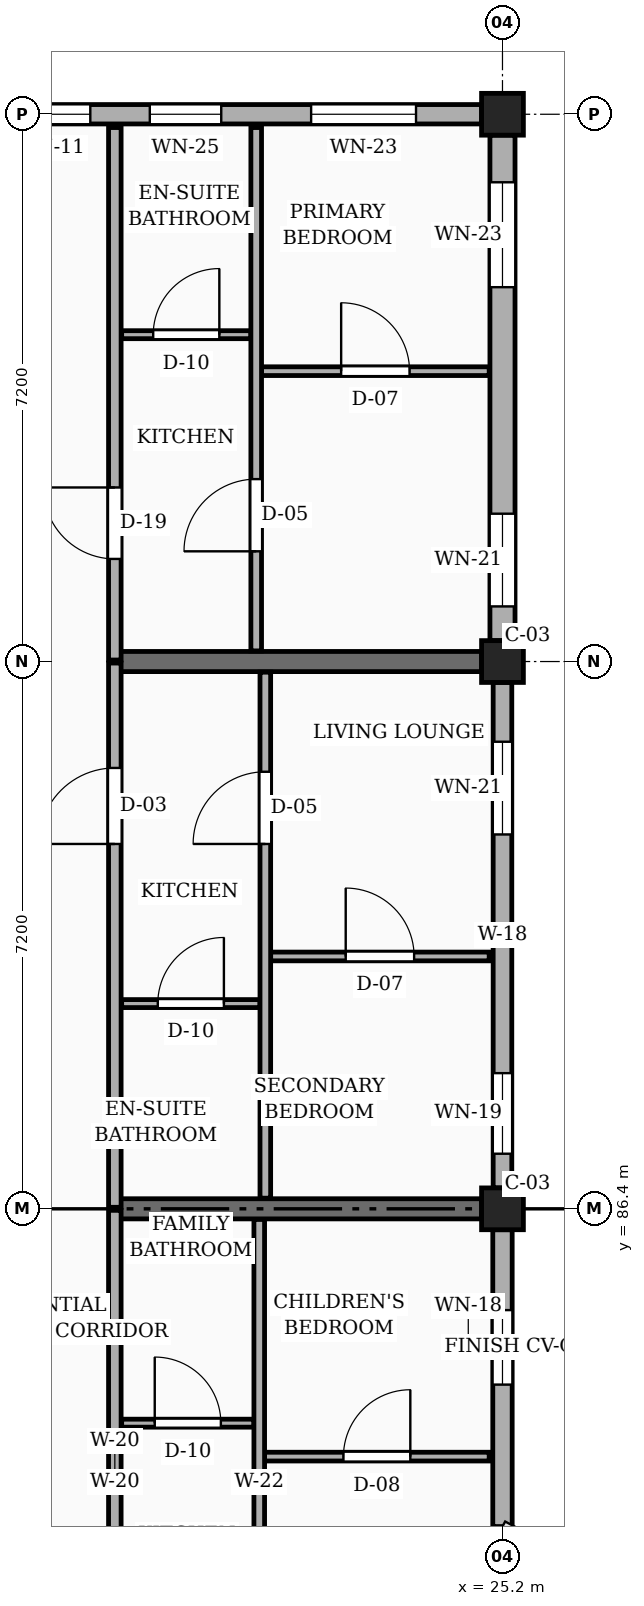
"""IFC4 building model, lengths in metres.
Left out: names, types, materials, properties, quantities, classifications, styles, units other than length and angle.
Written with IfcOpenShell. Run it as: python <this file> out.ifc"""

import sys

from ifc_helpers import new_model, si_unit, direction, frame, frame_2d, origin, origin_2d, place, context, subcontext, project, spatial, rectangle, extrude, element, fill, save


model = new_model("IFC4")
c1 = context("Model", 3, precision=1e-05, world=origin(), true_north=direction((0.0, 1.0)))
c2 = subcontext(c1, "Body", "Model", "MODEL_VIEW")
j1 = project(units=[si_unit("LENGTHUNIT", "METRE"), si_unit("PLANEANGLEUNIT", "RADIAN")], contexts=[c1])
p1 = place(None, origin())
s1 = spatial("IfcSite", under=j1, at=p1, CompositionType="ELEMENT")
p2 = place(p1, origin())
s2 = spatial("IfcBuilding", under=s1, at=p2, CompositionType="ELEMENT")
p3 = place(p2, frame((0.0, 0.0, 10.8)))
s3 = spatial("IfcBuildingStorey", under=s2, at=p3, CompositionType="ELEMENT", Elevation=10.8)
for number, where, z_axis, x_axis in (
    (1, (25.2, 86.4, 0.0), (0.0, 0.0, 1.0), (1.0, 0.0, 0.0)),
    (2, (25.2, 93.6, 0.0), (0.0, 0.0, 1.0), (1.0, 0.0, 0.0)),
    (3, (25.2, 100.8, 0.0), (0.0, 0.0, 1.0), (1.0, 0.0, 0.0)),
):
    element("IfcColumn", number, at=place(p3, frame(where, z_axis=z_axis, x_axis=x_axis)), inside=s3, PredefinedType="COLUMN", context=c2, shape_type="SweptSolid", body=[
        extrude(rectangle(XDim=0.55, YDim=0.55, at=origin_2d()), origin(), (0.0, 0.0, 1.0), 3.15),
    ])
for number, where, z_axis, x_axis in (
    (4, (20.1, 86.4, 0.0), (0.0, 0.0, 1.0), (1.0, 0.0, 0.0)),
    (5, (20.1, 93.6, 0.0), (0.0, 0.0, 1.0), (1.0, 0.0, 0.0)),
):
    element("IfcWall", number, at=place(p3, frame(where, z_axis=z_axis, x_axis=x_axis)), inside=s3, PredefinedType="SOLIDWALL", context=c2, shape_type="SweptSolid", body=[
        extrude(rectangle(XDim=4.825, YDim=0.265, at=frame_2d((2.413, 0.0))), origin(), (0.0, 0.0, 1.0), 2.21),
    ])
p4 = place(p3, frame((25.2, 82.22, 0.0), z_axis=(0.0, 0.0, 1.0), x_axis=(0.0, 1.0, 0.0)))
e6 = element("IfcWall", 6, at=p4, inside=s3, PredefinedType="SOLIDWALL", context=c2, shape_type="SweptSolid", body=[
    extrude(rectangle(XDim=3.905, YDim=0.255, at=frame_2d((1.953, 0.0))), origin(), (0.0, 0.0, 1.0), 2.48),
])
p5 = place(p4, frame((1.867, 0.0, 0.78)))
e7 = element("IfcOpeningElement", 7, at=p5, cuts=e6, PredefinedType="OPENING", context=c2, shape_type="SweptSolid", body=[
    extrude(rectangle(XDim=0.98, YDim=1.36, at=frame_2d((0.49, 0.68))), frame((0.0, 0.137, 0.0), z_axis=(0.0, -1.0, 0.0), x_axis=(1.0, 0.0, 0.0)), (0.0, 0.0, 1.0), 0.275),
])
p6 = place(p3, frame((25.2, 86.675, 0.0), z_axis=(0.0, 0.0, 1.0), x_axis=(0.0, 1.0, 0.0)))
e8 = element("IfcWall", 8, at=p6, inside=s3, PredefinedType="SOLIDWALL", context=c2, shape_type="SweptSolid", body=[
    extrude(rectangle(XDim=6.65, YDim=0.245, at=frame_2d((3.325, 0.0))), origin(), (0.0, 0.0, 1.0), 2.48),
])
p7 = place(p6, frame((0.45, 0.0, 0.78)))
e9 = element("IfcOpeningElement", 9, at=p7, cuts=e8, PredefinedType="OPENING", context=c2, shape_type="SweptSolid", body=[
    extrude(rectangle(XDim=1.06, YDim=1.36, at=frame_2d((0.53, 0.68))), frame((0.0, 0.133, 0.0), z_axis=(0.0, -1.0, 0.0), x_axis=(1.0, 0.0, 0.0)), (0.0, 0.0, 1.0), 0.265),
])
p8 = place(p6, frame((4.65, 0.0, 0.78)))
e10 = element("IfcOpeningElement", 10, at=p8, cuts=e8, PredefinedType="OPENING", context=c2, shape_type="SweptSolid", body=[
    extrude(rectangle(XDim=1.22, YDim=1.36, at=frame_2d((0.61, 0.68))), frame((0.0, 0.133, 0.0), z_axis=(0.0, -1.0, 0.0), x_axis=(1.0, 0.0, 0.0)), (0.0, 0.0, 1.0), 0.265),
])
p9 = place(p3, frame((25.2, 93.875, 0.0), z_axis=(0.0, 0.0, 1.0), x_axis=(0.0, 1.0, 0.0)))
e11 = element("IfcWall", 11, at=p9, inside=s3, PredefinedType="SOLIDWALL", context=c2, shape_type="SweptSolid", body=[
    extrude(rectangle(XDim=6.65, YDim=0.33, at=frame_2d((3.325, 0.0))), origin(), (0.0, 0.0, 1.0), 2.48),
])
p10 = place(p9, frame((0.45, 0.0, 0.78)))
e12 = element("IfcOpeningElement", 12, at=p10, cuts=e11, PredefinedType="OPENING", context=c2, shape_type="SweptSolid", body=[
    extrude(rectangle(XDim=1.22, YDim=1.36, at=frame_2d((0.61, 0.68))), frame((0.0, 0.175, 0.0), z_axis=(0.0, -1.0, 0.0), x_axis=(1.0, 0.0, 0.0)), (0.0, 0.0, 1.0), 0.35),
])
p11 = place(p9, frame((4.65, 0.0, 0.78)))
e13 = element("IfcOpeningElement", 13, at=p11, cuts=e11, PredefinedType="OPENING", context=c2, shape_type="SweptSolid", body=[
    extrude(rectangle(XDim=1.38, YDim=1.36, at=frame_2d((0.69, 0.68))), frame((0.0, 0.175, 0.0), z_axis=(0.0, -1.0, 0.0), x_axis=(1.0, 0.0, 0.0)), (0.0, 0.0, 1.0), 0.35),
])
p12 = place(p3, frame((24.925, 100.8, 0.0), z_axis=(0.0, 0.0, 1.0), x_axis=(-1.0, 0.0, 0.0)))
e14 = element("IfcWall", 14, at=p12, inside=s3, PredefinedType="SOLIDWALL", context=c2, shape_type="SweptSolid", body=[
    extrude(rectangle(XDim=6.65, YDim=0.255, at=frame_2d((3.325, 0.0))), origin(), (0.0, 0.0, 1.0), 2.48),
])
p13 = place(p12, frame((0.863, 0.0, 0.78)))
e15 = element("IfcOpeningElement", 15, at=p13, cuts=e14, PredefinedType="OPENING", context=c2, shape_type="SweptSolid", body=[
    extrude(rectangle(XDim=1.38, YDim=1.36, at=frame_2d((0.69, 0.68))), frame((0.0, 0.137, 0.0), z_axis=(0.0, -1.0, 0.0), x_axis=(1.0, 0.0, 0.0)), (0.0, 0.0, 1.0), 0.275),
])
p14 = place(p12, frame((3.425, 0.0, 0.78)))
e16 = element("IfcOpeningElement", 16, at=p14, cuts=e14, PredefinedType="OPENING", context=c2, shape_type="SweptSolid", body=[
    extrude(rectangle(XDim=0.94, YDim=1.44, at=frame_2d((0.47, 0.72))), frame((0.0, 0.137, 0.0), z_axis=(0.0, -1.0, 0.0), x_axis=(1.0, 0.0, 0.0)), (0.0, 0.0, 1.0), 0.275),
])
p15 = place(p12, frame((5.147, 0.0, 0.78)))
e17 = element("IfcOpeningElement", 17, at=p15, cuts=e14, PredefinedType="OPENING", context=c2, shape_type="SweptSolid", body=[
    extrude(rectangle(XDim=1.04, YDim=1.26, at=frame_2d((0.52, 0.63))), frame((0.0, 0.137, 0.0), z_axis=(0.0, -1.0, 0.0), x_axis=(1.0, 0.0, 0.0)), (0.0, 0.0, 1.0), 0.275),
])
p16 = place(p3, frame((20.1, 79.22, 0.0), z_axis=(0.0, 0.0, 1.0), x_axis=(0.0, 1.0, 0.0)))
e18 = element("IfcWall", 18, at=p16, inside=s3, PredefinedType="PARTITIONING", context=c2, shape_type="SweptSolid", body=[
    extrude(rectangle(XDim=7.16, YDim=0.165, at=frame_2d((3.58, 0.0))), origin(), (0.0, 0.0, 1.0), 2.345),
])
p17 = place(p16, frame((1.33, 0.0, 0.0)))
e19 = element("IfcOpeningElement", 19, at=p17, cuts=e18, PredefinedType="OPENING", context=c2, shape_type="SweptSolid", body=[
    extrude(rectangle(XDim=1.14, YDim=2.18, at=frame_2d((0.57, 1.09))), frame((0.0, 0.093, 0.0), z_axis=(0.0, -1.0, 0.0), x_axis=(1.0, 0.0, 0.0)), (0.0, 0.0, 1.0), 0.185),
])
p18 = place(p3, frame((20.1, 86.42, 0.0), z_axis=(0.0, 0.0, 1.0), x_axis=(0.0, 1.0, 0.0)))
e20 = element("IfcWall", 20, at=p18, inside=s3, PredefinedType="PARTITIONING", context=c2, shape_type="SweptSolid", body=[
    extrude(rectangle(XDim=7.16, YDim=0.165, at=frame_2d((3.58, 0.0))), origin(), (0.0, 0.0, 1.0), 2.345),
])
p19 = place(p18, frame((4.78, 0.0, 0.0)))
e21 = element("IfcOpeningElement", 21, at=p19, cuts=e20, PredefinedType="OPENING", context=c2, shape_type="SweptSolid", body=[
    extrude(rectangle(XDim=1.0, YDim=2.15, at=frame_2d((0.5, 1.075))), frame((0.0, 0.093, 0.0), z_axis=(0.0, -1.0, 0.0), x_axis=(1.0, 0.0, 0.0)), (0.0, 0.0, 1.0), 0.185),
])
p20 = place(p3, frame((20.1, 93.62, 0.0), z_axis=(0.0, 0.0, 1.0), x_axis=(0.0, 1.0, 0.0)))
e22 = element("IfcWall", 22, at=p20, inside=s3, PredefinedType="PARTITIONING", context=c2, shape_type="SweptSolid", body=[
    extrude(rectangle(XDim=7.005, YDim=0.165, at=frame_2d((3.502, 0.0))), origin(), (0.0, 0.0, 1.0), 2.345),
])
p21 = place(p20, frame((1.33, 0.0, 0.0)))
e23 = element("IfcOpeningElement", 23, at=p21, cuts=e22, PredefinedType="OPENING", context=c2, shape_type="SweptSolid", body=[
    extrude(rectangle(XDim=0.94, YDim=2.12, at=frame_2d((0.47, 1.06))), frame((0.0, 0.093, 0.0), z_axis=(0.0, -1.0, 0.0), x_axis=(1.0, 0.0, 0.0)), (0.0, 0.0, 1.0), 0.185),
])
p22 = place(p3, frame((22.07, 83.14, 0.0), z_axis=(0.0, 0.0, 1.0), x_axis=(1.0, 0.0, 0.0)))
e24 = element("IfcWall", 24, at=p22, inside=s3, PredefinedType="PARTITIONING", context=c2, shape_type="SweptSolid", body=[
    extrude(rectangle(XDim=2.955, YDim=0.115, at=frame_2d((1.478, 0.0))), origin(), (0.0, 0.0, 1.0), 2.345),
])
p23 = place(p22, frame((1.038, 0.0, 0.0)))
e25 = element("IfcOpeningElement", 25, at=p23, cuts=e24, PredefinedType="OPENING", context=c2, shape_type="SweptSolid", body=[
    extrude(rectangle(XDim=0.88, YDim=2.08, at=frame_2d((0.44, 1.04))), frame((0.0, 0.067, 0.0), z_axis=(0.0, -1.0, 0.0), x_axis=(1.0, 0.0, 0.0)), (0.0, 0.0, 1.0), 0.135),
])
p24 = place(p3, frame((20.19, 83.58, 0.0), z_axis=(0.0, 0.0, 1.0), x_axis=(1.0, 0.0, 0.0)))
e26 = element("IfcWall", 26, at=p24, inside=s3, PredefinedType="PARTITIONING", context=c2, shape_type="SweptSolid", body=[
    extrude(rectangle(XDim=1.74, YDim=0.105, at=frame_2d((0.87, 0.0))), origin(), (0.0, 0.0, 1.0), 2.345),
])
p25 = place(p24, frame((0.435, 0.0, 0.0)))
e27 = element("IfcOpeningElement", 27, at=p25, cuts=e26, PredefinedType="OPENING", context=c2, shape_type="SweptSolid", body=[
    extrude(rectangle(XDim=0.87, YDim=2.05, at=frame_2d((0.435, 1.025))), frame((0.0, 0.062, 0.0), z_axis=(0.0, -1.0, 0.0), x_axis=(1.0, 0.0, 0.0)), (0.0, 0.0, 1.0), 0.125),
])
p26 = place(p3, frame((22.0, 79.34, 0.0), z_axis=(0.0, 0.0, 1.0), x_axis=(0.0, 1.0, 0.0)))
e28 = element("IfcWall", 28, at=p26, inside=s3, PredefinedType="PARTITIONING", context=c2, shape_type="SweptSolid", body=[
    extrude(rectangle(XDim=6.92, YDim=0.14, at=frame_2d((3.46, 0.0))), origin(), (0.0, 0.0, 1.0), 2.345),
])
p27 = place(p26, frame((1.31, 0.0, 0.0)))
e29 = element("IfcOpeningElement", 29, at=p27, cuts=e28, PredefinedType="OPENING", context=c2, shape_type="SweptSolid", body=[
    extrude(rectangle(XDim=0.92, YDim=2.1, at=frame_2d((0.46, 1.05))), frame((0.0, 0.08, 0.0), z_axis=(0.0, -1.0, 0.0), x_axis=(1.0, 0.0, 0.0)), (0.0, 0.0, 1.0), 0.16),
])
p28 = place(p3, frame((22.15, 89.72, 0.0), z_axis=(0.0, 0.0, 1.0), x_axis=(1.0, 0.0, 0.0)))
e30 = element("IfcWall", 30, at=p28, inside=s3, PredefinedType="PARTITIONING", context=c2, shape_type="SweptSolid", body=[
    extrude(rectangle(XDim=2.875, YDim=0.115, at=frame_2d((1.438, 0.0))), origin(), (0.0, 0.0, 1.0), 2.345),
])
p29 = place(p28, frame((0.988, 0.0, 0.0)))
e31 = element("IfcOpeningElement", 31, at=p29, cuts=e30, PredefinedType="OPENING", context=c2, shape_type="SweptSolid", body=[
    extrude(rectangle(XDim=0.9, YDim=2.1, at=frame_2d((0.45, 1.05))), frame((0.0, 0.067, 0.0), z_axis=(0.0, -1.0, 0.0), x_axis=(1.0, 0.0, 0.0)), (0.0, 0.0, 1.0), 0.135),
])
p30 = place(p3, frame((20.19, 89.1, 0.0), z_axis=(0.0, 0.0, 1.0), x_axis=(1.0, 0.0, 0.0)))
e32 = element("IfcWall", 32, at=p30, inside=s3, PredefinedType="PARTITIONING", context=c2, shape_type="SweptSolid", body=[
    extrude(rectangle(XDim=1.82, YDim=0.105, at=frame_2d((0.91, 0.0))), origin(), (0.0, 0.0, 1.0), 2.345),
])
p31 = place(p30, frame((0.475, 0.0, 0.0)))
e33 = element("IfcOpeningElement", 33, at=p31, cuts=e32, PredefinedType="OPENING", context=c2, shape_type="SweptSolid", body=[
    extrude(rectangle(XDim=0.87, YDim=2.05, at=frame_2d((0.435, 1.025))), frame((0.0, 0.062, 0.0), z_axis=(0.0, -1.0, 0.0), x_axis=(1.0, 0.0, 0.0)), (0.0, 0.0, 1.0), 0.125),
])
p32 = place(p3, frame((22.08, 86.54, 0.0), z_axis=(0.0, 0.0, 1.0), x_axis=(0.0, 1.0, 0.0)))
e34 = element("IfcWall", 34, at=p32, inside=s3, PredefinedType="PARTITIONING", context=c2, shape_type="SweptSolid", body=[
    extrude(rectangle(XDim=6.92, YDim=0.14, at=frame_2d((3.46, 0.0))), origin(), (0.0, 0.0, 1.0), 2.345),
])
p33 = place(p32, frame((4.66, 0.0, 0.0)))
e35 = element("IfcOpeningElement", 35, at=p33, cuts=e34, PredefinedType="OPENING", context=c2, shape_type="SweptSolid", body=[
    extrude(rectangle(XDim=0.95, YDim=2.1, at=frame_2d((0.475, 1.05))), frame((0.0, 0.08, 0.0), z_axis=(0.0, -1.0, 0.0), x_axis=(1.0, 0.0, 0.0)), (0.0, 0.0, 1.0), 0.16),
])
p34 = place(p3, frame((22.03, 97.42, 0.0), z_axis=(0.0, 0.0, 1.0), x_axis=(1.0, 0.0, 0.0)))
e36 = element("IfcWall", 36, at=p34, inside=s3, PredefinedType="PARTITIONING", context=c2, shape_type="SweptSolid", body=[
    extrude(rectangle(XDim=2.995, YDim=0.115, at=frame_2d((1.498, 0.0))), origin(), (0.0, 0.0, 1.0), 2.345),
])
p35 = place(p34, frame((1.048, 0.0, 0.0)))
e37 = element("IfcOpeningElement", 37, at=p35, cuts=e36, PredefinedType="OPENING", context=c2, shape_type="SweptSolid", body=[
    extrude(rectangle(XDim=0.9, YDim=2.1, at=frame_2d((0.45, 1.05))), frame((0.0, 0.067, 0.0), z_axis=(0.0, -1.0, 0.0), x_axis=(1.0, 0.0, 0.0)), (0.0, 0.0, 1.0), 0.135),
])
p36 = place(p3, frame((20.19, 97.9, 0.0), z_axis=(0.0, 0.0, 1.0), x_axis=(1.0, 0.0, 0.0)))
e38 = element("IfcWall", 38, at=p36, inside=s3, PredefinedType="PARTITIONING", context=c2, shape_type="SweptSolid", body=[
    extrude(rectangle(XDim=1.7, YDim=0.105, at=frame_2d((0.85, 0.0))), origin(), (0.0, 0.0, 1.0), 2.345),
])
p37 = place(p36, frame((0.415, 0.0, 0.0)))
e39 = element("IfcOpeningElement", 39, at=p37, cuts=e38, PredefinedType="OPENING", context=c2, shape_type="SweptSolid", body=[
    extrude(rectangle(XDim=0.87, YDim=2.05, at=frame_2d((0.435, 1.025))), frame((0.0, 0.062, 0.0), z_axis=(0.0, -1.0, 0.0), x_axis=(1.0, 0.0, 0.0)), (0.0, 0.0, 1.0), 0.125),
])
p38 = place(p3, frame((21.96, 93.74, 0.0), z_axis=(0.0, 0.0, 1.0), x_axis=(0.0, 1.0, 0.0)))
e40 = element("IfcWall", 40, at=p38, inside=s3, PredefinedType="PARTITIONING", context=c2, shape_type="SweptSolid", body=[
    extrude(rectangle(XDim=6.885, YDim=0.14, at=frame_2d((3.442, 0.0))), origin(), (0.0, 0.0, 1.0), 2.345),
])
p39 = place(p38, frame((1.31, 0.0, 0.0)))
e41 = element("IfcOpeningElement", 41, at=p39, cuts=e40, PredefinedType="OPENING", context=c2, shape_type="SweptSolid", body=[
    extrude(rectangle(XDim=0.95, YDim=2.1, at=frame_2d((0.475, 1.05))), frame((0.0, 0.08, 0.0), z_axis=(0.0, -1.0, 0.0), x_axis=(1.0, 0.0, 0.0)), (0.0, 0.0, 1.0), 0.16),
])
p40 = place(p5, origin())
e42 = element("IfcWindow", 42, at=p40, inside=s3, PartitioningType="SINGLE_PANEL", PredefinedType="WINDOW", context=c2, shape_type="SweptSolid", body=[
    extrude(rectangle(XDim=0.98, YDim=1.36, at=frame_2d((0.49, 0.68))), frame((0.0, 0.03, 0.0), z_axis=(0.0, -1.0, 0.0), x_axis=(1.0, 0.0, 0.0)), (0.0, 0.0, 1.0), 0.06),
])
fill(e7, e42)
p41 = place(p7, origin())
e43 = element("IfcWindow", 43, at=p41, inside=s3, PartitioningType="SINGLE_PANEL", PredefinedType="WINDOW", context=c2, shape_type="SweptSolid", body=[
    extrude(rectangle(XDim=1.06, YDim=1.36, at=frame_2d((0.53, 0.68))), frame((0.0, 0.03, 0.0), z_axis=(0.0, -1.0, 0.0), x_axis=(1.0, 0.0, 0.0)), (0.0, 0.0, 1.0), 0.06),
])
fill(e9, e43)
p42 = place(p8, origin())
e44 = element("IfcWindow", 44, at=p42, inside=s3, PartitioningType="SINGLE_PANEL", PredefinedType="WINDOW", context=c2, shape_type="SweptSolid", body=[
    extrude(rectangle(XDim=1.22, YDim=1.36, at=frame_2d((0.61, 0.68))), frame((0.0, 0.03, 0.0), z_axis=(0.0, -1.0, 0.0), x_axis=(1.0, 0.0, 0.0)), (0.0, 0.0, 1.0), 0.06),
])
fill(e10, e44)
p43 = place(p10, origin())
e45 = element("IfcWindow", 45, at=p43, inside=s3, PartitioningType="SINGLE_PANEL", PredefinedType="WINDOW", context=c2, shape_type="SweptSolid", body=[
    extrude(rectangle(XDim=1.22, YDim=1.36, at=frame_2d((0.61, 0.68))), frame((0.0, 0.03, 0.0), z_axis=(0.0, -1.0, 0.0), x_axis=(1.0, 0.0, 0.0)), (0.0, 0.0, 1.0), 0.06),
])
fill(e12, e45)
p44 = place(p11, origin())
e46 = element("IfcWindow", 46, at=p44, inside=s3, PartitioningType="SINGLE_PANEL", PredefinedType="WINDOW", context=c2, shape_type="SweptSolid", body=[
    extrude(rectangle(XDim=1.38, YDim=1.36, at=frame_2d((0.69, 0.68))), frame((0.0, 0.03, 0.0), z_axis=(0.0, -1.0, 0.0), x_axis=(1.0, 0.0, 0.0)), (0.0, 0.0, 1.0), 0.06),
])
fill(e13, e46)
p45 = place(p13, origin())
e47 = element("IfcWindow", 47, at=p45, inside=s3, PartitioningType="SINGLE_PANEL", PredefinedType="WINDOW", context=c2, shape_type="SweptSolid", body=[
    extrude(rectangle(XDim=1.38, YDim=1.36, at=frame_2d((0.69, 0.68))), frame((0.0, 0.03, 0.0), z_axis=(0.0, -1.0, 0.0), x_axis=(1.0, 0.0, 0.0)), (0.0, 0.0, 1.0), 0.06),
])
fill(e15, e47)
p46 = place(p14, origin())
e48 = element("IfcWindow", 48, at=p46, inside=s3, PartitioningType="SINGLE_PANEL", PredefinedType="WINDOW", context=c2, shape_type="SweptSolid", body=[
    extrude(rectangle(XDim=0.94, YDim=1.44, at=frame_2d((0.47, 0.72))), frame((0.0, 0.03, 0.0), z_axis=(0.0, -1.0, 0.0), x_axis=(1.0, 0.0, 0.0)), (0.0, 0.0, 1.0), 0.06),
])
fill(e16, e48)
p47 = place(p15, origin())
e49 = element("IfcWindow", 49, at=p47, inside=s3, PartitioningType="SINGLE_PANEL", PredefinedType="WINDOW", context=c2, shape_type="SweptSolid", body=[
    extrude(rectangle(XDim=1.04, YDim=1.26, at=frame_2d((0.52, 0.63))), frame((0.0, 0.03, 0.0), z_axis=(0.0, -1.0, 0.0), x_axis=(1.0, 0.0, 0.0)), (0.0, 0.0, 1.0), 0.06),
])
fill(e17, e49)
p48 = place(p19, origin())
e50 = element("IfcDoor", 50, at=p48, inside=s3, OperationType="SINGLE_SWING_LEFT", PredefinedType="DOOR", context=c2, shape_type="SweptSolid", body=[
    extrude(rectangle(XDim=1.0, YDim=2.15, at=frame_2d((0.5, 1.075))), frame((0.0, 0.025, 0.0), z_axis=(0.0, -1.0, 0.0), x_axis=(1.0, 0.0, 0.0)), (0.0, 0.0, 1.0), 0.05),
])
fill(e21, e50)
p49 = place(p21, origin())
e51 = element("IfcDoor", 51, at=p49, inside=s3, OperationType="SINGLE_SWING_RIGHT", PredefinedType="DOOR", context=c2, shape_type="SweptSolid", body=[
    extrude(rectangle(XDim=0.94, YDim=2.12, at=frame_2d((0.47, 1.06))), frame((0.0, 0.025, 0.0), z_axis=(0.0, -1.0, 0.0), x_axis=(1.0, 0.0, 0.0)), (0.0, 0.0, 1.0), 0.05),
])
fill(e23, e51)
p50 = place(p23, origin())
e52 = element("IfcDoor", 52, at=p50, inside=s3, OperationType="SINGLE_SWING_RIGHT", PredefinedType="DOOR", context=c2, shape_type="SweptSolid", body=[
    extrude(rectangle(XDim=0.88, YDim=2.08, at=frame_2d((0.44, 1.04))), frame((0.0, 0.025, 0.0), z_axis=(0.0, -1.0, 0.0), x_axis=(1.0, 0.0, 0.0)), (0.0, 0.0, 1.0), 0.05),
])
fill(e25, e52)
p51 = place(p25, origin())
e53 = element("IfcDoor", 53, at=p51, inside=s3, OperationType="SINGLE_SWING_LEFT", PredefinedType="DOOR", context=c2, shape_type="SweptSolid", body=[
    extrude(rectangle(XDim=0.87, YDim=2.05, at=frame_2d((0.435, 1.025))), frame((0.0, 0.025, 0.0), z_axis=(0.0, -1.0, 0.0), x_axis=(1.0, 0.0, 0.0)), (0.0, 0.0, 1.0), 0.05),
])
fill(e27, e53)
p52 = place(p29, origin())
e54 = element("IfcDoor", 54, at=p52, inside=s3, OperationType="SINGLE_SWING_LEFT", PredefinedType="DOOR", context=c2, shape_type="SweptSolid", body=[
    extrude(rectangle(XDim=0.9, YDim=2.1, at=frame_2d((0.45, 1.05))), frame((0.0, 0.025, 0.0), z_axis=(0.0, -1.0, 0.0), x_axis=(1.0, 0.0, 0.0)), (0.0, 0.0, 1.0), 0.05),
])
fill(e31, e54)
p53 = place(p31, origin())
e55 = element("IfcDoor", 55, at=p53, inside=s3, OperationType="SINGLE_SWING_RIGHT", PredefinedType="DOOR", context=c2, shape_type="SweptSolid", body=[
    extrude(rectangle(XDim=0.87, YDim=2.05, at=frame_2d((0.435, 1.025))), frame((0.0, 0.025, 0.0), z_axis=(0.0, -1.0, 0.0), x_axis=(1.0, 0.0, 0.0)), (0.0, 0.0, 1.0), 0.05),
])
fill(e33, e55)
p54 = place(p33, origin())
e56 = element("IfcDoor", 56, at=p54, inside=s3, OperationType="SINGLE_SWING_LEFT", PredefinedType="DOOR", context=c2, shape_type="SweptSolid", body=[
    extrude(rectangle(XDim=0.95, YDim=2.1, at=frame_2d((0.475, 1.05))), frame((0.0, 0.025, 0.0), z_axis=(0.0, -1.0, 0.0), x_axis=(1.0, 0.0, 0.0)), (0.0, 0.0, 1.0), 0.05),
])
fill(e35, e56)
p55 = place(p35, origin())
e57 = element("IfcDoor", 57, at=p55, inside=s3, OperationType="SINGLE_SWING_LEFT", PredefinedType="DOOR", context=c2, shape_type="SweptSolid", body=[
    extrude(rectangle(XDim=0.9, YDim=2.1, at=frame_2d((0.45, 1.05))), frame((0.0, 0.025, 0.0), z_axis=(0.0, -1.0, 0.0), x_axis=(1.0, 0.0, 0.0)), (0.0, 0.0, 1.0), 0.05),
])
fill(e37, e57)
p56 = place(p37, origin())
e58 = element("IfcDoor", 58, at=p56, inside=s3, OperationType="SINGLE_SWING_RIGHT", PredefinedType="DOOR", context=c2, shape_type="SweptSolid", body=[
    extrude(rectangle(XDim=0.87, YDim=2.05, at=frame_2d((0.435, 1.025))), frame((0.0, 0.025, 0.0), z_axis=(0.0, -1.0, 0.0), x_axis=(1.0, 0.0, 0.0)), (0.0, 0.0, 1.0), 0.05),
])
fill(e39, e58)
p57 = place(p39, origin())
e59 = element("IfcDoor", 59, at=p57, inside=s3, OperationType="SINGLE_SWING_LEFT", PredefinedType="DOOR", context=c2, shape_type="SweptSolid", body=[
    extrude(rectangle(XDim=0.95, YDim=2.1, at=frame_2d((0.475, 1.05))), frame((0.0, 0.025, 0.0), z_axis=(0.0, -1.0, 0.0), x_axis=(1.0, 0.0, 0.0)), (0.0, 0.0, 1.0), 0.05),
])
fill(e41, e59)
save(model, sys.argv[1])
